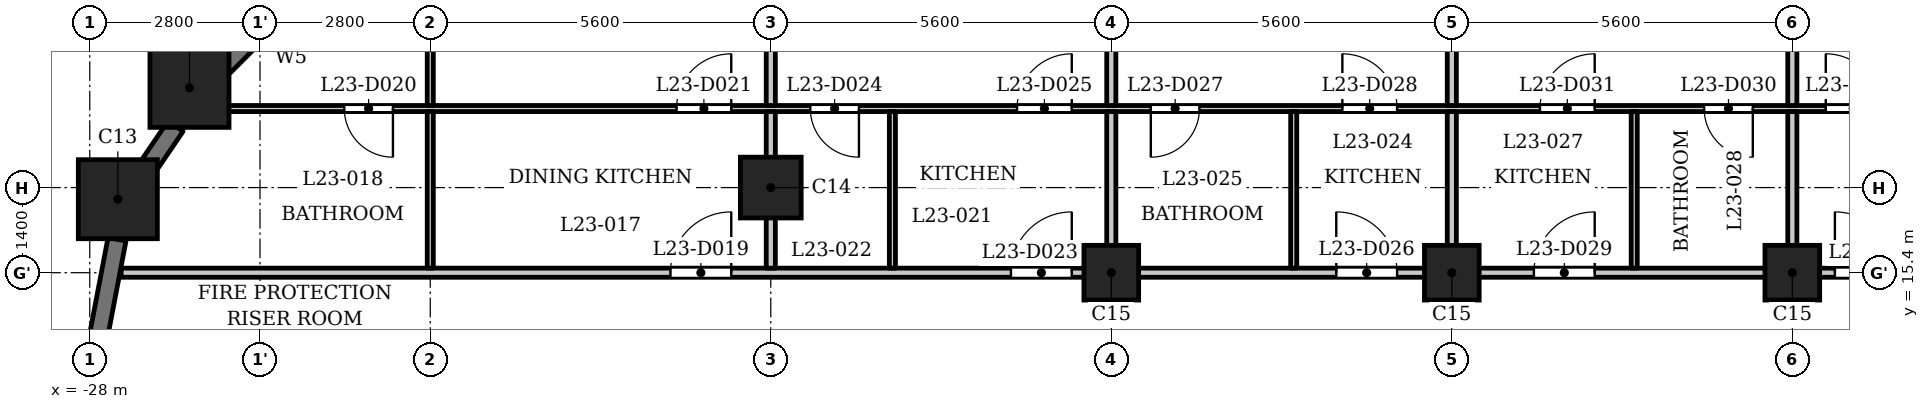
"""IFC4 building model, lengths in metres.
Left out: names, types, materials, properties, quantities, classifications, styles, units other than length and angle.
Written with IfcOpenShell. Run it as: python <this file> out.ifc"""

import sys

from ifc_helpers import new_model, si_unit, direction, frame, frame_2d, origin, origin_2d, place, context, subcontext, project, spatial, rectangle, extrude, element, fill, save


model = new_model("IFC4")
c1 = context("Model", 3, precision=1e-05, world=origin(), true_north=direction((0.0, 1.0)))
c2 = subcontext(c1, "Body", "Model", "MODEL_VIEW")
j1 = project(units=[si_unit("LENGTHUNIT", "METRE"), si_unit("PLANEANGLEUNIT", "RADIAN")], contexts=[c1])
p1 = place(None, origin())
s1 = spatial("IfcSite", under=j1, at=p1, CompositionType="ELEMENT")
p2 = place(p1, origin())
s2 = spatial("IfcBuilding", under=s1, at=p2, CompositionType="ELEMENT")
p3 = place(p2, frame((0.0, 0.0, 93.8)))
s3 = spatial("IfcBuildingStorey", under=s2, at=p3, CompositionType="ELEMENT", Elevation=93.8)
for number, where, z_axis, x_axis in (
    (1, (-26.36, 18.44, 0.0), (0.0, 0.0, 1.0), (1.0, 0.0, 0.0)),
    (2, (-27.538, 16.609, 0.0), (0.0, 0.0, 1.0), (1.0, 0.0, 0.0)),
):
    element("IfcColumn", number, at=place(p3, frame(where, z_axis=z_axis, x_axis=x_axis)), inside=s3, PredefinedType="COLUMN", context=c2, shape_type="SweptSolid", body=[
        extrude(rectangle(XDim=1.3, YDim=1.3, at=origin_2d()), origin(), (0.0, 0.0, 1.0), 3.5),
    ])
p4 = place(p3, frame((-16.8, 16.8, 0.0), z_axis=(0.0, 0.0, 1.0), x_axis=(1.0, 0.0, 0.0)))
e3 = element("IfcColumn", 3, at=p4, inside=s3, PredefinedType="COLUMN", context=c2, shape_type="SweptSolid", body=[
    extrude(rectangle(XDim=1.0, YDim=1.0, at=origin_2d()), origin(), (0.0, 0.0, 1.0), 3.5),
])
for number, where, z_axis, x_axis in (
    (4, (-11.2, 15.4, 0.0), (0.0, 0.0, 1.0), (1.0, 0.0, 0.0)),
    (5, (-5.6, 15.4, 0.0), (0.0, 0.0, 1.0), (1.0, 0.0, 0.0)),
    (6, (0.0, 15.4, 0.0), (0.0, 0.0, 1.0), (1.0, 0.0, 0.0)),
):
    element("IfcColumn", number, at=place(p3, frame(where, z_axis=z_axis, x_axis=x_axis)), inside=s3, PredefinedType="COLUMN", context=c2, shape_type="SweptSolid", body=[
        extrude(rectangle(XDim=0.9, YDim=0.9, at=origin_2d()), origin(), (0.0, 0.0, 1.0), 3.5),
    ])
p5 = place(p3, frame((-23.991, 20.597, 0.0), z_axis=(0.0, 0.0, 1.0), x_axis=(-0.707106781187, -0.707106781187, 0.0)))
e7 = element("IfcWall", 7, at=p5, inside=s3, PredefinedType="SOLIDWALL", context=c2, shape_type="SweptSolid", body=[
    extrude(rectangle(XDim=2.55, YDim=0.3, at=frame_2d((1.275, 0.0))), origin(), (0.0, 0.0, 1.0), 2.4),
])
p6 = place(p5, frame((0.875, 0.0, 0.6)))
e8 = element("IfcOpeningElement", 8, at=p6, cuts=e7, PredefinedType="OPENING", context=c2, shape_type="SweptSolid", body=[
    extrude(rectangle(XDim=0.8, YDim=1.55, at=frame_2d((0.4, 0.775))), frame((0.0, 0.16, 0.0), z_axis=(0.0, -1.0, 0.0), x_axis=(1.0, 0.0, 0.0)), (0.0, 0.0, 1.0), 0.32),
])
p7 = place(p3, frame((-26.589, 17.81, 0.0), z_axis=(0.0, 0.0, 1.0), x_axis=(-0.562066330934, -0.827092159091, 0.0)))
e9 = element("IfcWall", 9, at=p7, inside=s3, PredefinedType="SOLIDWALL", context=c2, shape_type="SweptSolid", body=[
    extrude(rectangle(XDim=0.877, YDim=0.3, at=frame_2d((0.438, 0.0))), origin(), (0.0, 0.0, 1.0), 3.2),
])
p8 = place(p3, frame((-27.552, 15.949, 0.0), z_axis=(0.0, 0.0, 1.0), x_axis=(-0.187279751651, -0.982306619453, 0.0)))
e10 = element("IfcWall", 10, at=p8, inside=s3, PredefinedType="SOLIDWALL", context=c2, shape_type="SweptSolid", body=[
    extrude(rectangle(XDim=1.606, YDim=0.3, at=frame_2d((0.803, 0.0))), origin(), (0.0, 0.0, 1.0), 2.4),
])
p9 = place(p3, frame((-27.484, 15.4, 0.0), z_axis=(0.0, 0.0, 1.0), x_axis=(1.0, 0.0, 0.0)))
e11 = element("IfcWall", 11, at=p9, inside=s3, PredefinedType="PARTITIONING", context=c2, shape_type="SweptSolid", body=[
    extrude(rectangle(XDim=54.968, YDim=0.15, at=frame_2d((27.484, 0.0))), origin(), (0.0, 0.0, 1.0), 3.2),
])
p10 = place(p9, frame((9.034, 0.0, 0.0)))
e12 = element("IfcOpeningElement", 12, at=p10, cuts=e11, PredefinedType="OPENING", context=c2, shape_type="SweptSolid", body=[
    extrude(rectangle(XDim=1.0, YDim=2.1, at=frame_2d((0.5, 1.05))), frame((0.0, 0.085, 0.0), z_axis=(0.0, -1.0, 0.0), x_axis=(1.0, 0.0, 0.0)), (0.0, 0.0, 1.0), 0.17),
])
p11 = place(p9, frame((14.634, 0.0, 0.0)))
e13 = element("IfcOpeningElement", 13, at=p11, cuts=e11, PredefinedType="OPENING", context=c2, shape_type="SweptSolid", body=[
    extrude(rectangle(XDim=1.0, YDim=2.1, at=frame_2d((0.5, 1.05))), frame((0.0, 0.085, 0.0), z_axis=(0.0, -1.0, 0.0), x_axis=(1.0, 0.0, 0.0)), (0.0, 0.0, 1.0), 0.17),
])
p12 = place(p9, frame((19.984, 0.0, 0.0)))
e14 = element("IfcOpeningElement", 14, at=p12, cuts=e11, PredefinedType="OPENING", context=c2, shape_type="SweptSolid", body=[
    extrude(rectangle(XDim=1.0, YDim=2.1, at=frame_2d((0.5, 1.05))), frame((0.0, 0.085, 0.0), z_axis=(0.0, -1.0, 0.0), x_axis=(1.0, 0.0, 0.0)), (0.0, 0.0, 1.0), 0.17),
])
p13 = place(p9, frame((23.234, 0.0, 0.0)))
e15 = element("IfcOpeningElement", 15, at=p13, cuts=e11, PredefinedType="OPENING", context=c2, shape_type="SweptSolid", body=[
    extrude(rectangle(XDim=1.0, YDim=2.1, at=frame_2d((0.5, 1.05))), frame((0.0, 0.085, 0.0), z_axis=(0.0, -1.0, 0.0), x_axis=(1.0, 0.0, 0.0)), (0.0, 0.0, 1.0), 0.17),
])
p14 = place(p9, frame((28.184, 0.0, 0.0)))
e16 = element("IfcOpeningElement", 16, at=p14, cuts=e11, PredefinedType="OPENING", context=c2, shape_type="SweptSolid", body=[
    extrude(rectangle(XDim=1.0, YDim=2.1, at=frame_2d((0.5, 1.05))), frame((0.0, 0.085, 0.0), z_axis=(0.0, -1.0, 0.0), x_axis=(1.0, 0.0, 0.0)), (0.0, 0.0, 1.0), 0.17),
])
p15 = place(p9, frame((39.284, 0.0, 0.0)))
e17 = element("IfcOpeningElement", 17, at=p15, cuts=e11, PredefinedType="OPENING", context=c2, shape_type="SweptSolid", body=[
    extrude(rectangle(XDim=1.0, YDim=2.1, at=frame_2d((0.5, 1.05))), frame((0.0, 0.085, 0.0), z_axis=(0.0, -1.0, 0.0), x_axis=(1.0, 0.0, 0.0)), (0.0, 0.0, 1.0), 0.17),
])
p16 = place(p9, frame((48.234, 0.0, 0.0)))
e18 = element("IfcOpeningElement", 18, at=p16, cuts=e11, PredefinedType="OPENING", context=c2, shape_type="SweptSolid", body=[
    extrude(rectangle(XDim=1.0, YDim=2.1, at=frame_2d((0.5, 1.05))), frame((0.0, 0.085, 0.0), z_axis=(0.0, -1.0, 0.0), x_axis=(1.0, 0.0, 0.0)), (0.0, 0.0, 1.0), 0.17),
])
p17 = place(p3, frame((-26.44, 18.1, 0.0), z_axis=(0.0, 0.0, 1.0), x_axis=(1.0, 0.0, 0.0)))
e19 = element("IfcWall", 19, at=p17, inside=s3, PredefinedType="PARTITIONING", context=c2, shape_type="SweptSolid", body=[
    extrude(rectangle(XDim=52.63, YDim=0.1, at=frame_2d((26.315, 0.0))), origin(), (0.0, 0.0, 1.0), 3.2),
])
p18 = place(p17, frame((2.626, 0.0, 0.0)))
e20 = element("IfcOpeningElement", 20, at=p18, cuts=e19, PredefinedType="OPENING", context=c2, shape_type="SweptSolid", body=[
    extrude(rectangle(XDim=0.8, YDim=2.1, at=frame_2d((0.4, 1.05))), frame((0.0, 0.06, 0.0), z_axis=(0.0, -1.0, 0.0), x_axis=(1.0, 0.0, 0.0)), (0.0, 0.0, 1.0), 0.12),
])
p19 = place(p17, frame((8.09, 0.0, 0.0)))
e21 = element("IfcOpeningElement", 21, at=p19, cuts=e19, PredefinedType="OPENING", context=c2, shape_type="SweptSolid", body=[
    extrude(rectangle(XDim=0.9, YDim=2.1, at=frame_2d((0.45, 1.05))), frame((0.0, 0.06, 0.0), z_axis=(0.0, -1.0, 0.0), x_axis=(1.0, 0.0, 0.0)), (0.0, 0.0, 1.0), 0.12),
])
p20 = place(p17, frame((10.29, 0.0, 0.0)))
e22 = element("IfcOpeningElement", 22, at=p20, cuts=e19, PredefinedType="OPENING", context=c2, shape_type="SweptSolid", body=[
    extrude(rectangle(XDim=0.8, YDim=2.1, at=frame_2d((0.4, 1.05))), frame((0.0, 0.06, 0.0), z_axis=(0.0, -1.0, 0.0), x_axis=(1.0, 0.0, 0.0)), (0.0, 0.0, 1.0), 0.12),
])
p21 = place(p17, frame((13.69, 0.0, 0.0)))
e23 = element("IfcOpeningElement", 23, at=p21, cuts=e19, PredefinedType="OPENING", context=c2, shape_type="SweptSolid", body=[
    extrude(rectangle(XDim=0.9, YDim=2.1, at=frame_2d((0.45, 1.05))), frame((0.0, 0.06, 0.0), z_axis=(0.0, -1.0, 0.0), x_axis=(1.0, 0.0, 0.0)), (0.0, 0.0, 1.0), 0.12),
])
p22 = place(p17, frame((15.89, 0.0, 0.0)))
e24 = element("IfcOpeningElement", 24, at=p22, cuts=e19, PredefinedType="OPENING", context=c2, shape_type="SweptSolid", body=[
    extrude(rectangle(XDim=0.8, YDim=2.1, at=frame_2d((0.4, 1.05))), frame((0.0, 0.06, 0.0), z_axis=(0.0, -1.0, 0.0), x_axis=(1.0, 0.0, 0.0)), (0.0, 0.0, 1.0), 0.12),
])
p23 = place(p17, frame((19.04, 0.0, 0.0)))
e25 = element("IfcOpeningElement", 25, at=p23, cuts=e19, PredefinedType="OPENING", context=c2, shape_type="SweptSolid", body=[
    extrude(rectangle(XDim=0.9, YDim=2.1, at=frame_2d((0.45, 1.05))), frame((0.0, 0.06, 0.0), z_axis=(0.0, -1.0, 0.0), x_axis=(1.0, 0.0, 0.0)), (0.0, 0.0, 1.0), 0.12),
])
p24 = place(p17, frame((24.99, 0.0, 0.0)))
e26 = element("IfcOpeningElement", 26, at=p24, cuts=e19, PredefinedType="OPENING", context=c2, shape_type="SweptSolid", body=[
    extrude(rectangle(XDim=0.8, YDim=2.1, at=frame_2d((0.4, 1.05))), frame((0.0, 0.06, 0.0), z_axis=(0.0, -1.0, 0.0), x_axis=(1.0, 0.0, 0.0)), (0.0, 0.0, 1.0), 0.12),
])
p25 = place(p17, frame((22.29, 0.0, 0.0)))
e27 = element("IfcOpeningElement", 27, at=p25, cuts=e19, PredefinedType="OPENING", context=c2, shape_type="SweptSolid", body=[
    extrude(rectangle(XDim=0.9, YDim=2.1, at=frame_2d((0.45, 1.05))), frame((0.0, 0.06, 0.0), z_axis=(0.0, -1.0, 0.0), x_axis=(1.0, 0.0, 0.0)), (0.0, 0.0, 1.0), 0.12),
])
p26 = place(p17, frame((32.69, 0.0, 0.0)))
e28 = element("IfcOpeningElement", 28, at=p26, cuts=e19, PredefinedType="OPENING", context=c2, shape_type="SweptSolid", body=[
    extrude(rectangle(XDim=0.8, YDim=2.1, at=frame_2d((0.4, 1.05))), frame((0.0, 0.06, 0.0), z_axis=(0.0, -1.0, 0.0), x_axis=(1.0, 0.0, 0.0)), (0.0, 0.0, 1.0), 0.12),
])
p27 = place(p17, frame((26.99, 0.0, 0.0)))
e29 = element("IfcOpeningElement", 29, at=p27, cuts=e19, PredefinedType="OPENING", context=c2, shape_type="SweptSolid", body=[
    extrude(rectangle(XDim=0.9, YDim=2.1, at=frame_2d((0.45, 1.05))), frame((0.0, 0.06, 0.0), z_axis=(0.0, -1.0, 0.0), x_axis=(1.0, 0.0, 0.0)), (0.0, 0.0, 1.0), 0.12),
])
p28 = place(p17, frame((41.29, 0.0, 0.0)))
e30 = element("IfcOpeningElement", 30, at=p28, cuts=e19, PredefinedType="OPENING", context=c2, shape_type="SweptSolid", body=[
    extrude(rectangle(XDim=0.8, YDim=2.1, at=frame_2d((0.4, 1.05))), frame((0.0, 0.06, 0.0), z_axis=(0.0, -1.0, 0.0), x_axis=(1.0, 0.0, 0.0)), (0.0, 0.0, 1.0), 0.12),
])
p29 = place(p17, frame((38.34, 0.0, 0.0)))
e31 = element("IfcOpeningElement", 31, at=p29, cuts=e19, PredefinedType="OPENING", context=c2, shape_type="SweptSolid", body=[
    extrude(rectangle(XDim=0.9, YDim=2.1, at=frame_2d((0.45, 1.05))), frame((0.0, 0.06, 0.0), z_axis=(0.0, -1.0, 0.0), x_axis=(1.0, 0.0, 0.0)), (0.0, 0.0, 1.0), 0.12),
])
p30 = place(p17, frame((50.74, 0.0, 0.0)))
e32 = element("IfcOpeningElement", 32, at=p30, cuts=e19, PredefinedType="OPENING", context=c2, shape_type="SweptSolid", body=[
    extrude(rectangle(XDim=0.8, YDim=2.1, at=frame_2d((0.4, 1.05))), frame((0.0, 0.06, 0.0), z_axis=(0.0, -1.0, 0.0), x_axis=(1.0, 0.0, 0.0)), (0.0, 0.0, 1.0), 0.12),
])
p31 = place(p17, frame((47.29, 0.0, 0.0)))
e33 = element("IfcOpeningElement", 33, at=p31, cuts=e19, PredefinedType="OPENING", context=c2, shape_type="SweptSolid", body=[
    extrude(rectangle(XDim=0.9, YDim=2.1, at=frame_2d((0.45, 1.05))), frame((0.0, 0.06, 0.0), z_axis=(0.0, -1.0, 0.0), x_axis=(1.0, 0.0, 0.0)), (0.0, 0.0, 1.0), 0.12),
])
p32 = place(p3, frame((-22.4, 15.475, 0.0), z_axis=(0.0, 0.0, 1.0), x_axis=(0.0, 1.0, 0.0)))
e34 = element("IfcWall", 34, at=p32, inside=s3, PredefinedType="PARTITIONING", context=c2, shape_type="SweptSolid", body=[
    extrude(rectangle(XDim=2.575, YDim=0.1, at=frame_2d((1.288, 0.0))), origin(), (0.0, 0.0, 1.0), 3.2),
])
p33 = place(p3, frame((-22.4, 18.15, 0.0), z_axis=(0.0, 0.0, 1.0), x_axis=(0.0, 1.0, 0.0)))
e35 = element("IfcWall", 35, at=p33, inside=s3, PredefinedType="PARTITIONING", context=c2, shape_type="SweptSolid", body=[
    extrude(rectangle(XDim=3.57, YDim=0.1, at=frame_2d((1.785, 0.0))), origin(), (0.0, 0.0, 1.0), 3.2),
])
p34 = place(p33, frame((1.298, 0.0, 0.0)))
e36 = element("IfcOpeningElement", 36, at=p34, cuts=e35, PredefinedType="OPENING", context=c2, shape_type="SweptSolid", body=[
    extrude(rectangle(XDim=0.9, YDim=2.1, at=frame_2d((0.45, 1.05))), frame((0.0, 0.06, 0.0), z_axis=(0.0, -1.0, 0.0), x_axis=(1.0, 0.0, 0.0)), (0.0, 0.0, 1.0), 0.12),
])
p35 = place(p3, frame((-16.8, 15.475, 0.0), z_axis=(0.0, 0.0, 1.0), x_axis=(0.0, 1.0, 0.0)))
e37 = element("IfcWall", 37, at=p35, inside=s3, PredefinedType="PARTITIONING", context=c2, shape_type="SweptSolid", body=[
    extrude(rectangle(XDim=2.575, YDim=0.15, at=frame_2d((1.288, 0.0))), origin(), (0.0, 0.0, 1.0), 3.2),
])
p36 = place(p3, frame((-16.8, 18.15, 0.0), z_axis=(0.0, 0.0, 1.0), x_axis=(0.0, 1.0, 0.0)))
e38 = element("IfcWall", 38, at=p36, inside=s3, PredefinedType="PARTITIONING", context=c2, shape_type="SweptSolid", body=[
    extrude(rectangle(XDim=4.88, YDim=0.15, at=frame_2d((2.44, 0.0))), origin(), (0.0, 0.0, 1.0), 3.2),
])
p37 = place(p3, frame((-14.8, 15.475, 0.0), z_axis=(0.0, 0.0, 1.0), x_axis=(0.0, 1.0, 0.0)))
e39 = element("IfcWall", 39, at=p37, inside=s3, PredefinedType="PARTITIONING", context=c2, shape_type="SweptSolid", body=[
    extrude(rectangle(XDim=2.575, YDim=0.1, at=frame_2d((1.288, 0.0))), origin(), (0.0, 0.0, 1.0), 3.2),
])
p38 = place(p3, frame((-11.2, 15.475, 0.0), z_axis=(0.0, 0.0, 1.0), x_axis=(0.0, 1.0, 0.0)))
e40 = element("IfcWall", 40, at=p38, inside=s3, PredefinedType="PARTITIONING", context=c2, shape_type="SweptSolid", body=[
    extrude(rectangle(XDim=2.575, YDim=0.15, at=frame_2d((1.288, 0.0))), origin(), (0.0, 0.0, 1.0), 3.2),
])
p39 = place(p3, frame((-11.2, 18.15, 0.0), z_axis=(0.0, 0.0, 1.0), x_axis=(0.0, 1.0, 0.0)))
e41 = element("IfcWall", 41, at=p39, inside=s3, PredefinedType="PARTITIONING", context=c2, shape_type="SweptSolid", body=[
    extrude(rectangle(XDim=4.88, YDim=0.15, at=frame_2d((2.44, 0.0))), origin(), (0.0, 0.0, 1.0), 3.2),
])
p40 = place(p3, frame((-8.2, 15.475, 0.0), z_axis=(0.0, 0.0, 1.0), x_axis=(0.0, 1.0, 0.0)))
e42 = element("IfcWall", 42, at=p40, inside=s3, PredefinedType="PARTITIONING", context=c2, shape_type="SweptSolid", body=[
    extrude(rectangle(XDim=2.575, YDim=0.1, at=frame_2d((1.288, 0.0))), origin(), (0.0, 0.0, 1.0), 3.2),
])
p41 = place(p3, frame((-5.6, 15.475, 0.0), z_axis=(0.0, 0.0, 1.0), x_axis=(0.0, 1.0, 0.0)))
e43 = element("IfcWall", 43, at=p41, inside=s3, PredefinedType="PARTITIONING", context=c2, shape_type="SweptSolid", body=[
    extrude(rectangle(XDim=2.575, YDim=0.15, at=frame_2d((1.288, 0.0))), origin(), (0.0, 0.0, 1.0), 3.2),
])
p42 = place(p3, frame((-5.6, 18.15, 0.0), z_axis=(0.0, 0.0, 1.0), x_axis=(0.0, 1.0, 0.0)))
e44 = element("IfcWall", 44, at=p42, inside=s3, PredefinedType="PARTITIONING", context=c2, shape_type="SweptSolid", body=[
    extrude(rectangle(XDim=4.88, YDim=0.15, at=frame_2d((2.44, 0.0))), origin(), (0.0, 0.0, 1.0), 3.2),
])
p43 = place(p3, frame((-2.6, 15.475, 0.0), z_axis=(0.0, 0.0, 1.0), x_axis=(0.0, 1.0, 0.0)))
e45 = element("IfcWall", 45, at=p43, inside=s3, PredefinedType="PARTITIONING", context=c2, shape_type="SweptSolid", body=[
    extrude(rectangle(XDim=2.575, YDim=0.1, at=frame_2d((1.288, 0.0))), origin(), (0.0, 0.0, 1.0), 3.2),
])
p44 = place(p3, frame((0.0, 15.475, 0.0), z_axis=(0.0, 0.0, 1.0), x_axis=(0.0, 1.0, 0.0)))
e46 = element("IfcWall", 46, at=p44, inside=s3, PredefinedType="PARTITIONING", context=c2, shape_type="SweptSolid", body=[
    extrude(rectangle(XDim=2.575, YDim=0.15, at=frame_2d((1.288, 0.0))), origin(), (0.0, 0.0, 1.0), 3.2),
])
p45 = place(p3, frame((0.0, 18.15, 0.0), z_axis=(0.0, 0.0, 1.0), x_axis=(0.0, 1.0, 0.0)))
e47 = element("IfcWall", 47, at=p45, inside=s3, PredefinedType="PARTITIONING", context=c2, shape_type="SweptSolid", body=[
    extrude(rectangle(XDim=4.88, YDim=0.15, at=frame_2d((2.44, 0.0))), origin(), (0.0, 0.0, 1.0), 3.2),
])
p46 = place(p10, origin())
e48 = element("IfcDoor", 48, at=p46, inside=s3, OperationType="SINGLE_SWING_LEFT", PredefinedType="DOOR", context=c2, shape_type="SweptSolid", body=[
    extrude(rectangle(XDim=1.0, YDim=2.1, at=frame_2d((0.5, 1.05))), frame((0.0, 0.025, 0.0), z_axis=(0.0, -1.0, 0.0), x_axis=(1.0, 0.0, 0.0)), (0.0, 0.0, 1.0), 0.05),
])
fill(e12, e48)
p47 = place(p18, origin())
e49 = element("IfcDoor", 49, at=p47, inside=s3, OperationType="SINGLE_SWING_RIGHT", PredefinedType="DOOR", context=c2, shape_type="SweptSolid", body=[
    extrude(rectangle(XDim=0.8, YDim=2.1, at=frame_2d((0.4, 1.05))), frame((0.0, 0.025, 0.0), z_axis=(0.0, -1.0, 0.0), x_axis=(1.0, 0.0, 0.0)), (0.0, 0.0, 1.0), 0.05),
])
fill(e20, e49)
p48 = place(p19, origin())
e50 = element("IfcDoor", 50, at=p48, inside=s3, OperationType="SINGLE_SWING_LEFT", PredefinedType="DOOR", context=c2, shape_type="SweptSolid", body=[
    extrude(rectangle(XDim=0.9, YDim=2.1, at=frame_2d((0.45, 1.05))), frame((0.0, 0.025, 0.0), z_axis=(0.0, -1.0, 0.0), x_axis=(1.0, 0.0, 0.0)), (0.0, 0.0, 1.0), 0.05),
])
fill(e21, e50)
p49 = place(p11, origin())
e51 = element("IfcDoor", 51, at=p49, inside=s3, OperationType="SINGLE_SWING_LEFT", PredefinedType="DOOR", context=c2, shape_type="SweptSolid", body=[
    extrude(rectangle(XDim=1.0, YDim=2.1, at=frame_2d((0.5, 1.05))), frame((0.0, 0.025, 0.0), z_axis=(0.0, -1.0, 0.0), x_axis=(1.0, 0.0, 0.0)), (0.0, 0.0, 1.0), 0.05),
])
fill(e13, e51)
p50 = place(p20, origin())
e52 = element("IfcDoor", 52, at=p50, inside=s3, OperationType="SINGLE_SWING_RIGHT", PredefinedType="DOOR", context=c2, shape_type="SweptSolid", body=[
    extrude(rectangle(XDim=0.8, YDim=2.1, at=frame_2d((0.4, 1.05))), frame((0.0, 0.025, 0.0), z_axis=(0.0, -1.0, 0.0), x_axis=(1.0, 0.0, 0.0)), (0.0, 0.0, 1.0), 0.05),
])
fill(e22, e52)
p51 = place(p21, origin())
e53 = element("IfcDoor", 53, at=p51, inside=s3, OperationType="SINGLE_SWING_LEFT", PredefinedType="DOOR", context=c2, shape_type="SweptSolid", body=[
    extrude(rectangle(XDim=0.9, YDim=2.1, at=frame_2d((0.45, 1.05))), frame((0.0, 0.025, 0.0), z_axis=(0.0, -1.0, 0.0), x_axis=(1.0, 0.0, 0.0)), (0.0, 0.0, 1.0), 0.05),
])
fill(e23, e53)
p52 = place(p12, origin())
e54 = element("IfcDoor", 54, at=p52, inside=s3, OperationType="SINGLE_SWING_RIGHT", PredefinedType="DOOR", context=c2, shape_type="SweptSolid", body=[
    extrude(rectangle(XDim=1.0, YDim=2.1, at=frame_2d((0.5, 1.05))), frame((0.0, 0.025, 0.0), z_axis=(0.0, -1.0, 0.0), x_axis=(1.0, 0.0, 0.0)), (0.0, 0.0, 1.0), 0.05),
])
fill(e14, e54)
p53 = place(p22, origin())
e55 = element("IfcDoor", 55, at=p53, inside=s3, OperationType="SINGLE_SWING_LEFT", PredefinedType="DOOR", context=c2, shape_type="SweptSolid", body=[
    extrude(rectangle(XDim=0.8, YDim=2.1, at=frame_2d((0.4, 1.05))), frame((0.0, 0.025, 0.0), z_axis=(0.0, -1.0, 0.0), x_axis=(1.0, 0.0, 0.0)), (0.0, 0.0, 1.0), 0.05),
])
fill(e24, e55)
p54 = place(p23, origin())
e56 = element("IfcDoor", 56, at=p54, inside=s3, OperationType="SINGLE_SWING_RIGHT", PredefinedType="DOOR", context=c2, shape_type="SweptSolid", body=[
    extrude(rectangle(XDim=0.9, YDim=2.1, at=frame_2d((0.45, 1.05))), frame((0.0, 0.025, 0.0), z_axis=(0.0, -1.0, 0.0), x_axis=(1.0, 0.0, 0.0)), (0.0, 0.0, 1.0), 0.05),
])
fill(e25, e56)
p55 = place(p13, origin())
e57 = element("IfcDoor", 57, at=p55, inside=s3, OperationType="SINGLE_SWING_LEFT", PredefinedType="DOOR", context=c2, shape_type="SweptSolid", body=[
    extrude(rectangle(XDim=1.0, YDim=2.1, at=frame_2d((0.5, 1.05))), frame((0.0, 0.025, 0.0), z_axis=(0.0, -1.0, 0.0), x_axis=(1.0, 0.0, 0.0)), (0.0, 0.0, 1.0), 0.05),
])
fill(e15, e57)
p56 = place(p24, origin())
e58 = element("IfcDoor", 58, at=p56, inside=s3, OperationType="SINGLE_SWING_RIGHT", PredefinedType="DOOR", context=c2, shape_type="SweptSolid", body=[
    extrude(rectangle(XDim=0.8, YDim=2.1, at=frame_2d((0.4, 1.05))), frame((0.0, 0.025, 0.0), z_axis=(0.0, -1.0, 0.0), x_axis=(1.0, 0.0, 0.0)), (0.0, 0.0, 1.0), 0.05),
])
fill(e26, e58)
p57 = place(p25, origin())
e59 = element("IfcDoor", 59, at=p57, inside=s3, OperationType="SINGLE_SWING_LEFT", PredefinedType="DOOR", context=c2, shape_type="SweptSolid", body=[
    extrude(rectangle(XDim=0.9, YDim=2.1, at=frame_2d((0.45, 1.05))), frame((0.0, 0.025, 0.0), z_axis=(0.0, -1.0, 0.0), x_axis=(1.0, 0.0, 0.0)), (0.0, 0.0, 1.0), 0.05),
])
fill(e27, e59)
p58 = place(p14, origin())
e60 = element("IfcDoor", 60, at=p58, inside=s3, OperationType="SINGLE_SWING_RIGHT", PredefinedType="DOOR", context=c2, shape_type="SweptSolid", body=[
    extrude(rectangle(XDim=1.0, YDim=2.1, at=frame_2d((0.5, 1.05))), frame((0.0, 0.025, 0.0), z_axis=(0.0, -1.0, 0.0), x_axis=(1.0, 0.0, 0.0)), (0.0, 0.0, 1.0), 0.05),
])
fill(e16, e60)
p59 = place(p27, origin())
e61 = element("IfcDoor", 61, at=p59, inside=s3, OperationType="SINGLE_SWING_RIGHT", PredefinedType="DOOR", context=c2, shape_type="SweptSolid", body=[
    extrude(rectangle(XDim=0.9, YDim=2.1, at=frame_2d((0.45, 1.05))), frame((0.0, 0.025, 0.0), z_axis=(0.0, -1.0, 0.0), x_axis=(1.0, 0.0, 0.0)), (0.0, 0.0, 1.0), 0.05),
])
fill(e29, e61)
save(model, sys.argv[1])
